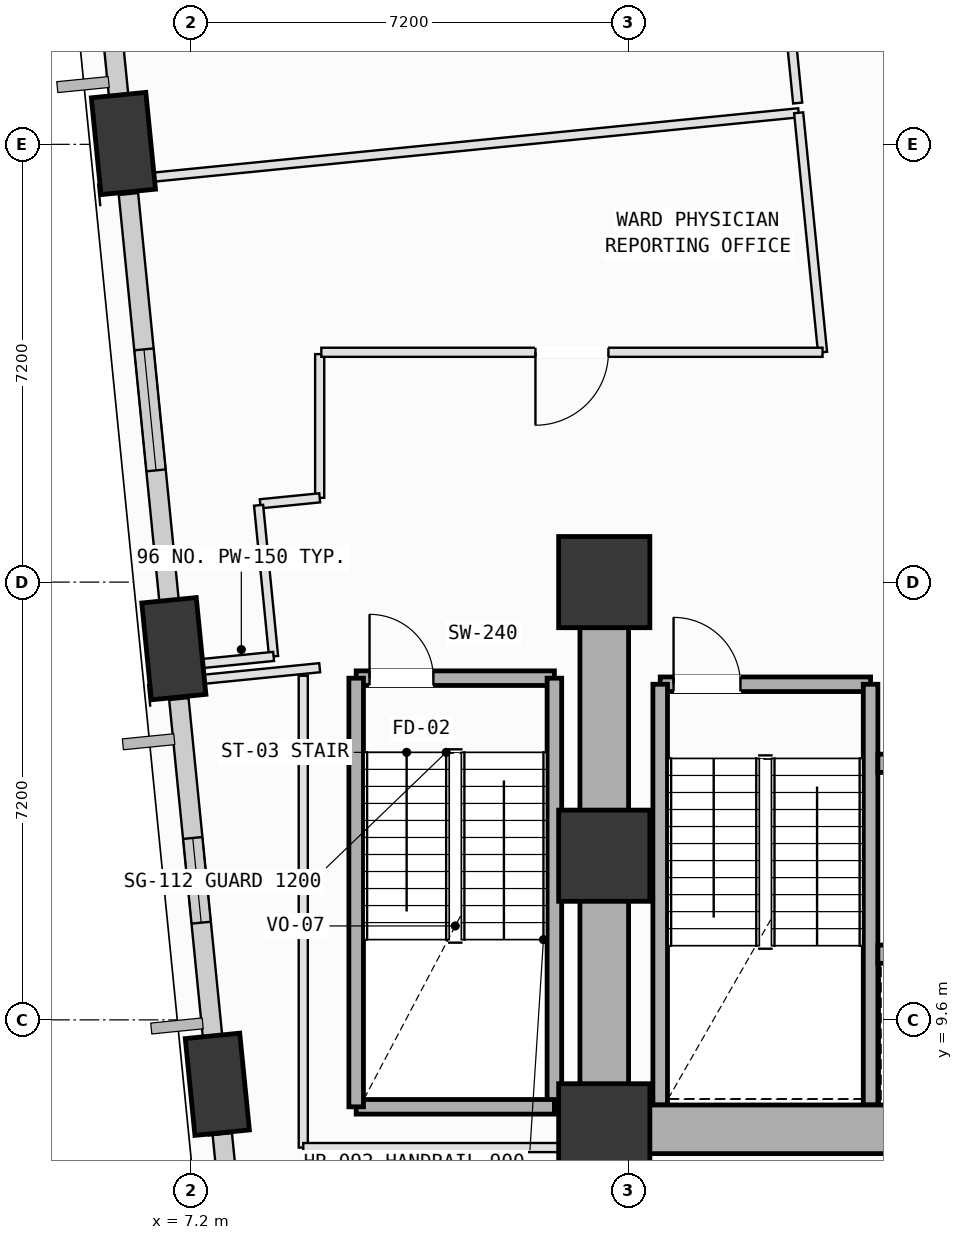
"""IFC4 building model, lengths in metres.
Left out: names, types, materials, properties, quantities, classifications, styles, units other than length and angle.
Written with IfcOpenShell. Run it as: python <this file> out.ifc"""

import sys

from ifc_helpers import new_model, si_unit, direction, frame, frame_2d, origin, origin_2d, place, context, subcontext, project, spatial, rectangle, extrude, element, fill, save


model = new_model("IFC4")
c1 = context("Model", 3, precision=1e-05, world=origin(), true_north=direction((0.0, 1.0)))
c2 = subcontext(c1, "Body", "Model", "MODEL_VIEW")
j1 = project(units=[si_unit("LENGTHUNIT", "METRE"), si_unit("PLANEANGLEUNIT", "RADIAN")], contexts=[c1])
p1 = place(None, origin())
s1 = spatial("IfcSite", under=j1, at=p1, CompositionType="ELEMENT")
p2 = place(p1, origin())
s2 = spatial("IfcBuilding", under=s1, at=p2, CompositionType="ELEMENT")
p3 = place(p2, frame((0.0, 0.0, 47.0)))
s3 = spatial("IfcBuildingStorey", under=s2, at=p3, CompositionType="ELEMENT", Elevation=47.0)
for number, where, z_axis, x_axis in (
    (1, (14.0, 7.8, 0.0), (0.0, 0.0, 1.0), (1.0, 0.0, 0.0)),
    (2, (14.0, 12.3, 0.0), (0.0, 0.0, 1.0), (1.0, 0.0, 0.0)),
    (3, (14.0, 16.8, 0.0), (0.0, 0.0, 1.0), (1.0, 0.0, 0.0)),
):
    element("IfcColumn", number, at=place(p3, frame(where, z_axis=z_axis, x_axis=x_axis)), inside=s3, PredefinedType="COLUMN", context=c2, shape_type="SweptSolid", body=[
        extrude(rectangle(XDim=1.5, YDim=1.5, at=origin_2d()), origin(), (0.0, 0.0, 1.0), 4.0),
    ])
p4 = place(p3, frame((6.092, 24.014, 0.002), z_axis=(0.004187870803, -0.113254593007, 0.99355717445), x_axis=(-0.135784547747, 0.984299301738, 0.112771632916)))
e4 = element("IfcColumn", 4, at=p4, inside=s3, PredefinedType="COLUMN", context=c2, shape_type="SweptSolid", body=[
    extrude(rectangle(XDim=1.6, YDim=0.9, at=origin_2d()), origin(), (0.0, 0.0, 1.0), 4.022),
])
p5 = place(p3, frame((6.921, 15.705, 0.002), z_axis=(0.038346412063, -0.109517838251, 0.993244882084), x_axis=(-0.420351330266, 0.899984986177, 0.115463343969)))
e5 = element("IfcColumn", 5, at=p5, inside=s3, PredefinedType="COLUMN", context=c2, shape_type="SweptSolid", body=[
    extrude(rectangle(XDim=1.6, YDim=0.9, at=origin_2d()), origin(), (0.0, 0.0, 1.0), 4.024),
])
p6 = place(p3, frame((7.636, 8.541, 0.002), z_axis=(0.067751375391, -0.1062327022, 0.992030424995), x_axis=(-0.614531721209, 0.778865669784, 0.125375564047)))
e6 = element("IfcColumn", 6, at=p6, inside=s3, PredefinedType="COLUMN", context=c2, shape_type="SweptSolid", body=[
    extrude(rectangle(XDim=1.6, YDim=0.9, at=origin_2d()), origin(), (0.0, 0.0, 1.0), 4.029),
])
p7 = place(p3, frame((6.054, 24.392, 0.0), z_axis=(0.0, 0.0, 1.0), x_axis=(-0.099308134144, 0.995056729284, 0.0)))
e7 = element("IfcWall", 7, at=p7, inside=s3, PredefinedType="SOLIDWALL", context=c2, shape_type="SweptSolid", body=[
    extrude(rectangle(XDim=5.438, YDim=0.32, at=frame_2d((2.719, 0.0))), origin(), (0.0, 0.0, 1.0), 3.165),
])
p8 = place(p7, frame((1.918, 0.0, 0.75)))
e8 = element("IfcOpeningElement", 8, at=p8, cuts=e7, PredefinedType="OPENING", context=c2, shape_type="SweptSolid", body=[
    extrude(rectangle(XDim=1.6, YDim=1.95, at=frame_2d((0.8, 0.975))), frame((0.0, 0.17, 0.0), z_axis=(0.0, -1.0, 0.0), x_axis=(1.0, 0.0, 0.0)), (0.0, 0.0, 1.0), 0.34),
])
p9 = place(p3, frame((6.884, 16.082, 0.0), z_axis=(0.0, 0.0, 1.0), x_axis=(-0.099314033415, 0.99505614051, 0.0)))
e9 = element("IfcWall", 9, at=p9, inside=s3, PredefinedType="SOLIDWALL", context=c2, shape_type="SweptSolid", body=[
    extrude(rectangle(XDim=7.136, YDim=0.32, at=frame_2d((3.568, 0.0))), origin(), (0.0, 0.0, 1.0), 3.165),
])
p10 = place(p9, frame((2.569, 0.0, 0.75)))
e10 = element("IfcOpeningElement", 10, at=p10, cuts=e9, PredefinedType="OPENING", context=c2, shape_type="SweptSolid", body=[
    extrude(rectangle(XDim=2.0, YDim=1.95, at=frame_2d((1.0, 0.975))), frame((0.0, 0.17, 0.0), z_axis=(0.0, -1.0, 0.0), x_axis=(1.0, 0.0, 0.0)), (0.0, 0.0, 1.0), 0.34),
])
p11 = place(p3, frame((7.6, 8.909, 0.0), z_axis=(0.0, 0.0, 1.0), x_axis=(-0.09929009343, 0.995058529608, 0.0)))
e11 = element("IfcWall", 11, at=p11, inside=s3, PredefinedType="SOLIDWALL", context=c2, shape_type="SweptSolid", body=[
    extrude(rectangle(XDim=5.997, YDim=0.32, at=frame_2d((2.999, 0.0))), origin(), (0.0, 0.0, 1.0), 3.165),
])
p12 = place(p11, frame((2.301, 0.0, 0.75)))
e12 = element("IfcOpeningElement", 12, at=p12, cuts=e11, PredefinedType="OPENING", context=c2, shape_type="SweptSolid", body=[
    extrude(rectangle(XDim=1.4, YDim=1.85, at=frame_2d((0.7, 0.925))), frame((0.0, 0.17, 0.0), z_axis=(0.0, -1.0, 0.0), x_axis=(1.0, 0.0, 0.0)), (0.0, 0.0, 1.0), 0.34),
])
p13 = place(p3, frame((8.157, 3.327, 0.0), z_axis=(0.0, 0.0, 1.0), x_axis=(-0.099334053302, 0.995054142173, 0.0)))
e13 = element("IfcWall", 13, at=p13, inside=s3, PredefinedType="SOLIDWALL", context=c2, shape_type="SweptSolid", body=[
    extrude(rectangle(XDim=4.417, YDim=0.32, at=frame_2d((2.208, 0.0))), origin(), (0.0, 0.0, 1.0), 3.165),
])
p14 = place(p13, frame((1.311, 0.0, 0.75)))
e14 = element("IfcOpeningElement", 14, at=p14, cuts=e13, PredefinedType="OPENING", context=c2, shape_type="SweptSolid", body=[
    extrude(rectangle(XDim=1.8, YDim=2.05, at=frame_2d((0.9, 1.025))), frame((0.0, 0.17, 0.0), z_axis=(0.0, -1.0, 0.0), x_axis=(1.0, 0.0, 0.0)), (0.0, 0.0, 1.0), 0.34),
])
p15 = place(p3, frame((14.92, 15.12, 0.0), z_axis=(0.0, 0.0, 1.0), x_axis=(1.0, 0.0, 0.0)))
e15 = element("IfcWall", 15, at=p15, inside=s3, PredefinedType="SOLIDWALL", context=c2, shape_type="SweptSolid", body=[
    extrude(rectangle(XDim=3.46, YDim=0.24, at=frame_2d((1.73, 0.0))), origin(), (0.0, 0.0, 1.0), 3.78),
])
p16 = place(p15, frame((0.22, 0.0, 0.0)))
e16 = element("IfcOpeningElement", 16, at=p16, cuts=e15, PredefinedType="OPENING", context=c2, shape_type="SweptSolid", body=[
    extrude(rectangle(XDim=1.1, YDim=2.15, at=frame_2d((0.55, 1.075))), frame((0.0, 0.13, 0.0), z_axis=(0.0, -1.0, 0.0), x_axis=(1.0, 0.0, 0.0)), (0.0, 0.0, 1.0), 0.26),
])
for number, where, z_axis, x_axis in (
    (17, (18.38, 15.12, 0.0), (0.0, 0.0, 1.0), (0.0, -1.0, 0.0)),
    (18, (14.92, 8.2, 0.0), (0.0, 0.0, 1.0), (0.0, 1.0, 0.0)),
):
    element("IfcWall", number, at=place(p3, frame(where, z_axis=z_axis, x_axis=x_axis)), inside=s3, PredefinedType="SOLIDWALL", context=c2, shape_type="SweptSolid", body=[
        extrude(rectangle(XDim=6.92, YDim=0.24, at=frame_2d((3.46, 0.0))), origin(), (0.0, 0.0, 1.0), 3.78),
    ])
p17 = place(p3, frame((9.92, 15.22, 0.0), z_axis=(0.0, 0.0, 1.0), x_axis=(1.0, 0.0, 0.0)))
e19 = element("IfcWall", 19, at=p17, inside=s3, PredefinedType="SOLIDWALL", context=c2, shape_type="SweptSolid", body=[
    extrude(rectangle(XDim=3.26, YDim=0.24, at=frame_2d((1.63, 0.0))), origin(), (0.0, 0.0, 1.0), 3.78),
])
p18 = place(p17, frame((0.22, 0.0, 0.0)))
e20 = element("IfcOpeningElement", 20, at=p18, cuts=e19, PredefinedType="OPENING", context=c2, shape_type="SweptSolid", body=[
    extrude(rectangle(XDim=1.05, YDim=2.15, at=frame_2d((0.525, 1.075))), frame((0.0, 0.13, 0.0), z_axis=(0.0, -1.0, 0.0), x_axis=(1.0, 0.0, 0.0)), (0.0, 0.0, 1.0), 0.26),
])
p19 = place(p3, frame((13.18, 15.22, 0.0), z_axis=(0.0, 0.0, 1.0), x_axis=(0.0, -1.0, 0.0)))
e21 = element("IfcWall", 21, at=p19, inside=s3, PredefinedType="SOLIDWALL", context=c2, shape_type="SweptSolid", body=[
    extrude(rectangle(XDim=7.05, YDim=0.24, at=frame_2d((3.525, 0.0))), origin(), (0.0, 0.0, 1.0), 3.78),
])
p20 = place(p3, frame((13.18, 8.17, 0.0), z_axis=(0.0, 0.0, 1.0), x_axis=(-1.0, 0.0, 0.0)))
e22 = element("IfcWall", 22, at=p20, inside=s3, PredefinedType="SOLIDWALL", context=c2, shape_type="SweptSolid", body=[
    extrude(rectangle(XDim=3.26, YDim=0.24, at=frame_2d((1.63, 0.0))), origin(), (0.0, 0.0, 1.0), 3.78),
])
p21 = place(p3, frame((9.92, 8.17, 0.0), z_axis=(0.0, 0.0, 1.0), x_axis=(0.0, 1.0, 0.0)))
e23 = element("IfcWall", 23, at=p21, inside=s3, PredefinedType="SOLIDWALL", context=c2, shape_type="SweptSolid", body=[
    extrude(rectangle(XDim=7.05, YDim=0.24, at=frame_2d((3.525, 0.0))), origin(), (0.0, 0.0, 1.0), 3.78),
])
p22 = place(p3, frame((14.0, 7.8, 0.0), z_axis=(0.0, 0.0, 1.0), x_axis=(1.0, 0.0, 0.0)))
e24 = element("IfcWall", 24, at=p22, inside=s3, PredefinedType="SHEAR", context=c2, shape_type="SweptSolid", body=[
    extrude(rectangle(XDim=10.8, YDim=0.8, at=frame_2d((5.4, 0.0))), origin(), (0.0, 0.0, 1.0), 3.78),
])
p23 = place(p3, frame((14.0, 16.8, 0.0), z_axis=(0.0, 0.0, 1.0), x_axis=(0.0, -1.0, 0.0)))
e25 = element("IfcWall", 25, at=p23, inside=s3, PredefinedType="SHEAR", context=c2, shape_type="SweptSolid", body=[
    extrude(rectangle(XDim=9.0, YDim=0.8, at=frame_2d((4.5, 0.0))), origin(), (0.0, 0.0, 1.0), 3.78),
])
p24 = place(p3, frame((18.5, 10.68, 0.0), z_axis=(0.0, 0.0, 1.0), x_axis=(1.0, 0.0, 0.0)))
e26 = element("IfcWall", 26, at=p24, inside=s3, PredefinedType="SOLIDWALL", context=c2, shape_type="SweptSolid", body=[
    extrude(rectangle(XDim=5.3, YDim=0.3, at=frame_2d((2.65, 0.0))), origin(), (0.0, 0.0, 1.0), 3.78),
])
p25 = place(p24, frame((4.22, 0.0, 0.0)))
e27 = element("IfcOpeningElement", 27, at=p25, cuts=e26, PredefinedType="OPENING", context=c2, shape_type="SweptSolid", body=[
    extrude(rectangle(XDim=0.86, YDim=2.06, at=frame_2d((0.43, 1.03))), frame((0.0, 0.16, 0.0), z_axis=(0.0, -1.0, 0.0), x_axis=(1.0, 0.0, 0.0)), (0.0, 0.0, 1.0), 0.32),
])
p26 = place(p24, frame((0.425, 0.0, 0.0)))
e28 = element("IfcOpeningElement", 28, at=p26, cuts=e26, PredefinedType="OPENING", context=c2, shape_type="SweptSolid", body=[
    extrude(rectangle(XDim=1.25, YDim=2.18, at=frame_2d((0.625, 1.09))), frame((0.0, 0.16, 0.0), z_axis=(0.0, -1.0, 0.0), x_axis=(1.0, 0.0, 0.0)), (0.0, 0.0, 1.0), 0.32),
])
p27 = place(p24, frame((2.525, 0.0, 0.0)))
e29 = element("IfcOpeningElement", 29, at=p27, cuts=e26, PredefinedType="OPENING", context=c2, shape_type="SweptSolid", body=[
    extrude(rectangle(XDim=1.25, YDim=2.18, at=frame_2d((0.625, 1.09))), frame((0.0, 0.16, 0.0), z_axis=(0.0, -1.0, 0.0), x_axis=(1.0, 0.0, 0.0)), (0.0, 0.0, 1.0), 0.32),
])
p28 = place(p3, frame((18.5, 13.82, 0.0), z_axis=(0.0, 0.0, 1.0), x_axis=(1.0, 0.0, 0.0)))
e30 = element("IfcWall", 30, at=p28, inside=s3, PredefinedType="SOLIDWALL", context=c2, shape_type="SweptSolid", body=[
    extrude(rectangle(XDim=5.3, YDim=0.3, at=frame_2d((2.65, 0.0))), origin(), (0.0, 0.0, 1.0), 3.78),
])
p29 = place(p28, frame((0.18, 0.0, 0.0)))
e31 = element("IfcOpeningElement", 31, at=p29, cuts=e30, PredefinedType="OPENING", context=c2, shape_type="SweptSolid", body=[
    extrude(rectangle(XDim=1.1, YDim=2.15, at=frame_2d((0.55, 1.075))), frame((0.0, 0.16, 0.0), z_axis=(0.0, -1.0, 0.0), x_axis=(1.0, 0.0, 0.0)), (0.0, 0.0, 1.0), 0.32),
])
p30 = place(p3, frame((6.827, 15.143, 0.0), z_axis=(0.0, 0.0, 1.0), x_axis=(0.995048760406, 0.099387949042, 0.0)))
e32 = element("IfcWall", 32, at=p30, inside=s3, PredefinedType="PARTITIONING", context=c2, shape_type="SweptSolid", body=[
    extrude(rectangle(XDim=2.506, YDim=0.15, at=frame_2d((1.253, 0.0))), origin(), (0.0, 0.0, 1.0), 2.865),
])
p31 = place(p3, frame((9.05, 15.26, 0.0), z_axis=(0.0, 0.0, 1.0), x_axis=(0.0, -1.0, 0.0)))
e33 = element("IfcWall", 33, at=p31, inside=s3, PredefinedType="PARTITIONING", context=c2, shape_type="SweptSolid", body=[
    extrude(rectangle(XDim=7.76, YDim=0.15, at=frame_2d((3.88, 0.0))), origin(), (0.0, 0.0, 1.0), 3.78),
])
p32 = place(p3, frame((9.05, 7.5, 0.0), z_axis=(0.0, 0.0, 1.0), x_axis=(1.0, 0.0, 0.0)))
e34 = element("IfcWall", 34, at=p32, inside=s3, PredefinedType="PARTITIONING", context=c2, shape_type="SweptSolid", body=[
    extrude(rectangle(XDim=4.95, YDim=0.15, at=frame_2d((2.475, 0.0))), origin(), (0.0, 0.0, 1.0), 3.78),
])
p33 = place(p3, frame((7.569, 7.707, 0.0), z_axis=(0.0, 0.0, 1.0), x_axis=(-0.098977273317, 0.995089694132, 0.0)))
e35 = element("IfcWall", 35, at=p33, inside=s3, PredefinedType="PARTITIONING", context=c2, shape_type="SweptSolid", body=[
    extrude(rectangle(XDim=1.194, YDim=0.15, at=frame_2d((0.597, 0.0))), origin(), (0.0, 0.0, 1.0), 3.165),
])
p34 = place(p3, frame((9.32, 20.55, 0.0), z_axis=(0.0, 0.0, 1.0), x_axis=(0.0, -1.0, 0.0)))
e36 = element("IfcWall", 36, at=p34, inside=s3, PredefinedType="PARTITIONING", context=c2, shape_type="SweptSolid", body=[
    extrude(rectangle(XDim=2.364, YDim=0.15, at=frame_2d((1.182, 0.0))), origin(), (0.0, 0.0, 1.0), 3.78),
])
p35 = place(p3, frame((9.32, 18.186, 0.0), z_axis=(0.0, 0.0, 1.0), x_axis=(-0.995002701999, -0.099847999552, 0.0)))
e37 = element("IfcWall", 37, at=p35, inside=s3, PredefinedType="PARTITIONING", context=c2, shape_type="SweptSolid", body=[
    extrude(rectangle(XDim=0.983, YDim=0.15, at=frame_2d((0.491, 0.0))), origin(), (0.0, 0.0, 1.0), 3.78),
])
p36 = place(p3, frame((8.315, 18.064, 0.0), z_axis=(0.0, 0.0, 1.0), x_axis=(0.098894150447, -0.995097958498, 0.0)))
e38 = element("IfcWall", 38, at=p36, inside=s3, PredefinedType="PARTITIONING", context=c2, shape_type="SweptSolid", body=[
    extrude(rectangle(XDim=2.498, YDim=0.15, at=frame_2d((1.249, 0.0))), origin(), (0.0, 0.0, 1.0), 3.78),
])
p37 = place(p3, frame((8.562, 15.578, 0.0), z_axis=(0.0, 0.0, 1.0), x_axis=(-0.995051550864, -0.099360007665, 0.0)))
e39 = element("IfcWall", 39, at=p37, inside=s3, PredefinedType="PARTITIONING", context=c2, shape_type="SweptSolid", body=[
    extrude(rectangle(XDim=1.85, YDim=0.15, at=frame_2d((0.925, 0.0))), origin(), (0.0, 0.0, 1.0), 2.865),
])
p38 = place(p3, frame((6.721, 15.394, 0.0), z_axis=(0.0, 0.0, 1.0), x_axis=(-0.098635601058, 0.995123619559, 0.0)))
e40 = element("IfcWall", 40, at=p38, inside=s3, PredefinedType="PARTITIONING", context=c2, shape_type="SweptSolid", body=[
    extrude(rectangle(XDim=0.668, YDim=0.15, at=frame_2d((0.334, 0.0))), origin(), (0.0, 0.0, 1.0), 3.165),
])
p39 = place(p3, frame((5.923, 23.394, 0.0), z_axis=(0.0, 0.0, 1.0), x_axis=(0.995058076509, 0.099294634167, 0.0)))
e41 = element("IfcWall", 41, at=p39, inside=s3, PredefinedType="PARTITIONING", context=c2, shape_type="SweptSolid", body=[
    extrude(rectangle(XDim=11.33, YDim=0.15, at=frame_2d((5.665, 0.0))), origin(), (0.0, 0.0, 1.0), 3.78),
])
p40 = place(p3, frame((17.197, 24.519, 0.0), z_axis=(0.0, 0.0, 1.0), x_axis=(0.099296099403, -0.995057930295, 0.0)))
e42 = element("IfcWall", 42, at=p40, inside=s3, PredefinedType="PARTITIONING", context=c2, shape_type="SweptSolid", body=[
    extrude(rectangle(XDim=3.958, YDim=0.15, at=frame_2d((1.979, 0.0))), origin(), (0.0, 0.0, 1.0), 3.78),
])
p41 = place(p3, frame((17.59, 20.58, 0.0), z_axis=(0.0, 0.0, 1.0), x_axis=(-1.0, 0.0, 0.0)))
e43 = element("IfcWall", 43, at=p41, inside=s3, PredefinedType="PARTITIONING", context=c2, shape_type="SweptSolid", body=[
    extrude(rectangle(XDim=8.243, YDim=0.15, at=frame_2d((4.122, 0.0))), origin(), (0.0, 0.0, 1.0), 3.78),
])
p42 = place(p41, frame((3.521, 0.0, 0.0)))
e44 = element("IfcOpeningElement", 44, at=p42, cuts=e43, PredefinedType="OPENING", context=c2, shape_type="SweptSolid", body=[
    extrude(rectangle(XDim=1.2, YDim=2.15, at=frame_2d((0.6, 1.075))), frame((0.0, 0.085, 0.0), z_axis=(0.0, -1.0, 0.0), x_axis=(1.0, 0.0, 0.0)), (0.0, 0.0, 1.0), 0.17),
])
p43 = place(p3, frame((16.382, 32.679, 0.0), z_axis=(0.0, 0.0, 1.0), x_axis=(0.099359401625, -0.995051611379, 0.0)))
e45 = element("IfcWall", 45, at=p43, inside=s3, PredefinedType="PARTITIONING", context=c2, shape_type="SweptSolid", body=[
    extrude(rectangle(XDim=8.04, YDim=0.15, at=frame_2d((4.02, 0.0))), origin(), (0.0, 0.0, 1.0), 3.78),
])
p44 = place(p43, frame((3.42, 0.0, 0.0)))
e46 = element("IfcOpeningElement", 46, at=p44, cuts=e45, PredefinedType="OPENING", context=c2, shape_type="SweptSolid", body=[
    extrude(rectangle(XDim=1.2, YDim=2.15, at=frame_2d((0.6, 1.075))), frame((0.0, 0.085, 0.0), z_axis=(0.0, -1.0, 0.0), x_axis=(1.0, 0.0, 0.0)), (0.0, 0.0, 1.0), 0.17),
])
p45 = place(p3, frame((5.907, 23.553, 0.0), z_axis=(0.0, 0.0, 1.0), x_axis=(-0.100034296973, 0.994983989534, 0.0)))
e47 = element("IfcWall", 47, at=p45, inside=s3, PredefinedType="PARTITIONING", context=c2, shape_type="SweptSolid", body=[
    extrude(rectangle(XDim=0.82, YDim=0.15, at=frame_2d((0.41, 0.0))), origin(), (0.0, 0.0, 1.0), 3.165),
])
p46 = place(p10, origin())
e48 = element("IfcWindow", 48, at=p46, inside=s3, PartitioningType="SINGLE_PANEL", PredefinedType="WINDOW", context=c2, shape_type="SweptSolid", body=[
    extrude(rectangle(XDim=2.0, YDim=1.95, at=frame_2d((1.0, 0.975))), frame((0.0, 0.03, 0.0), z_axis=(0.0, -1.0, 0.0), x_axis=(1.0, 0.0, 0.0)), (0.0, 0.0, 1.0), 0.06),
])
fill(e10, e48)
p47 = place(p12, origin())
e49 = element("IfcWindow", 49, at=p47, inside=s3, PartitioningType="SINGLE_PANEL", PredefinedType="WINDOW", context=c2, shape_type="SweptSolid", body=[
    extrude(rectangle(XDim=1.4, YDim=1.85, at=frame_2d((0.7, 0.925))), frame((0.0, 0.03, 0.0), z_axis=(0.0, -1.0, 0.0), x_axis=(1.0, 0.0, 0.0)), (0.0, 0.0, 1.0), 0.06),
])
fill(e12, e49)
p48 = place(p16, origin())
e50 = element("IfcDoor", 50, at=p48, inside=s3, OperationType="SINGLE_SWING_LEFT", PredefinedType="DOOR", context=c2, shape_type="SweptSolid", body=[
    extrude(rectangle(XDim=1.1, YDim=2.15, at=frame_2d((0.55, 1.075))), frame((0.0, 0.025, 0.0), z_axis=(0.0, -1.0, 0.0), x_axis=(1.0, 0.0, 0.0)), (0.0, 0.0, 1.0), 0.05),
])
fill(e16, e50)
p49 = place(p18, origin())
e51 = element("IfcDoor", 51, at=p49, inside=s3, OperationType="SINGLE_SWING_LEFT", PredefinedType="DOOR", context=c2, shape_type="SweptSolid", body=[
    extrude(rectangle(XDim=1.05, YDim=2.15, at=frame_2d((0.525, 1.075))), frame((0.0, 0.025, 0.0), z_axis=(0.0, -1.0, 0.0), x_axis=(1.0, 0.0, 0.0)), (0.0, 0.0, 1.0), 0.05),
])
fill(e20, e51)
p50 = place(p42, origin())
e52 = element("IfcDoor", 52, at=p50, inside=s3, OperationType="SINGLE_SWING_RIGHT", PredefinedType="DOOR", context=c2, shape_type="SweptSolid", body=[
    extrude(rectangle(XDim=1.2, YDim=2.15, at=frame_2d((0.6, 1.075))), frame((0.0, 0.025, 0.0), z_axis=(0.0, -1.0, 0.0), x_axis=(1.0, 0.0, 0.0)), (0.0, 0.0, 1.0), 0.05),
])
fill(e44, e52)
save(model, sys.argv[1])
